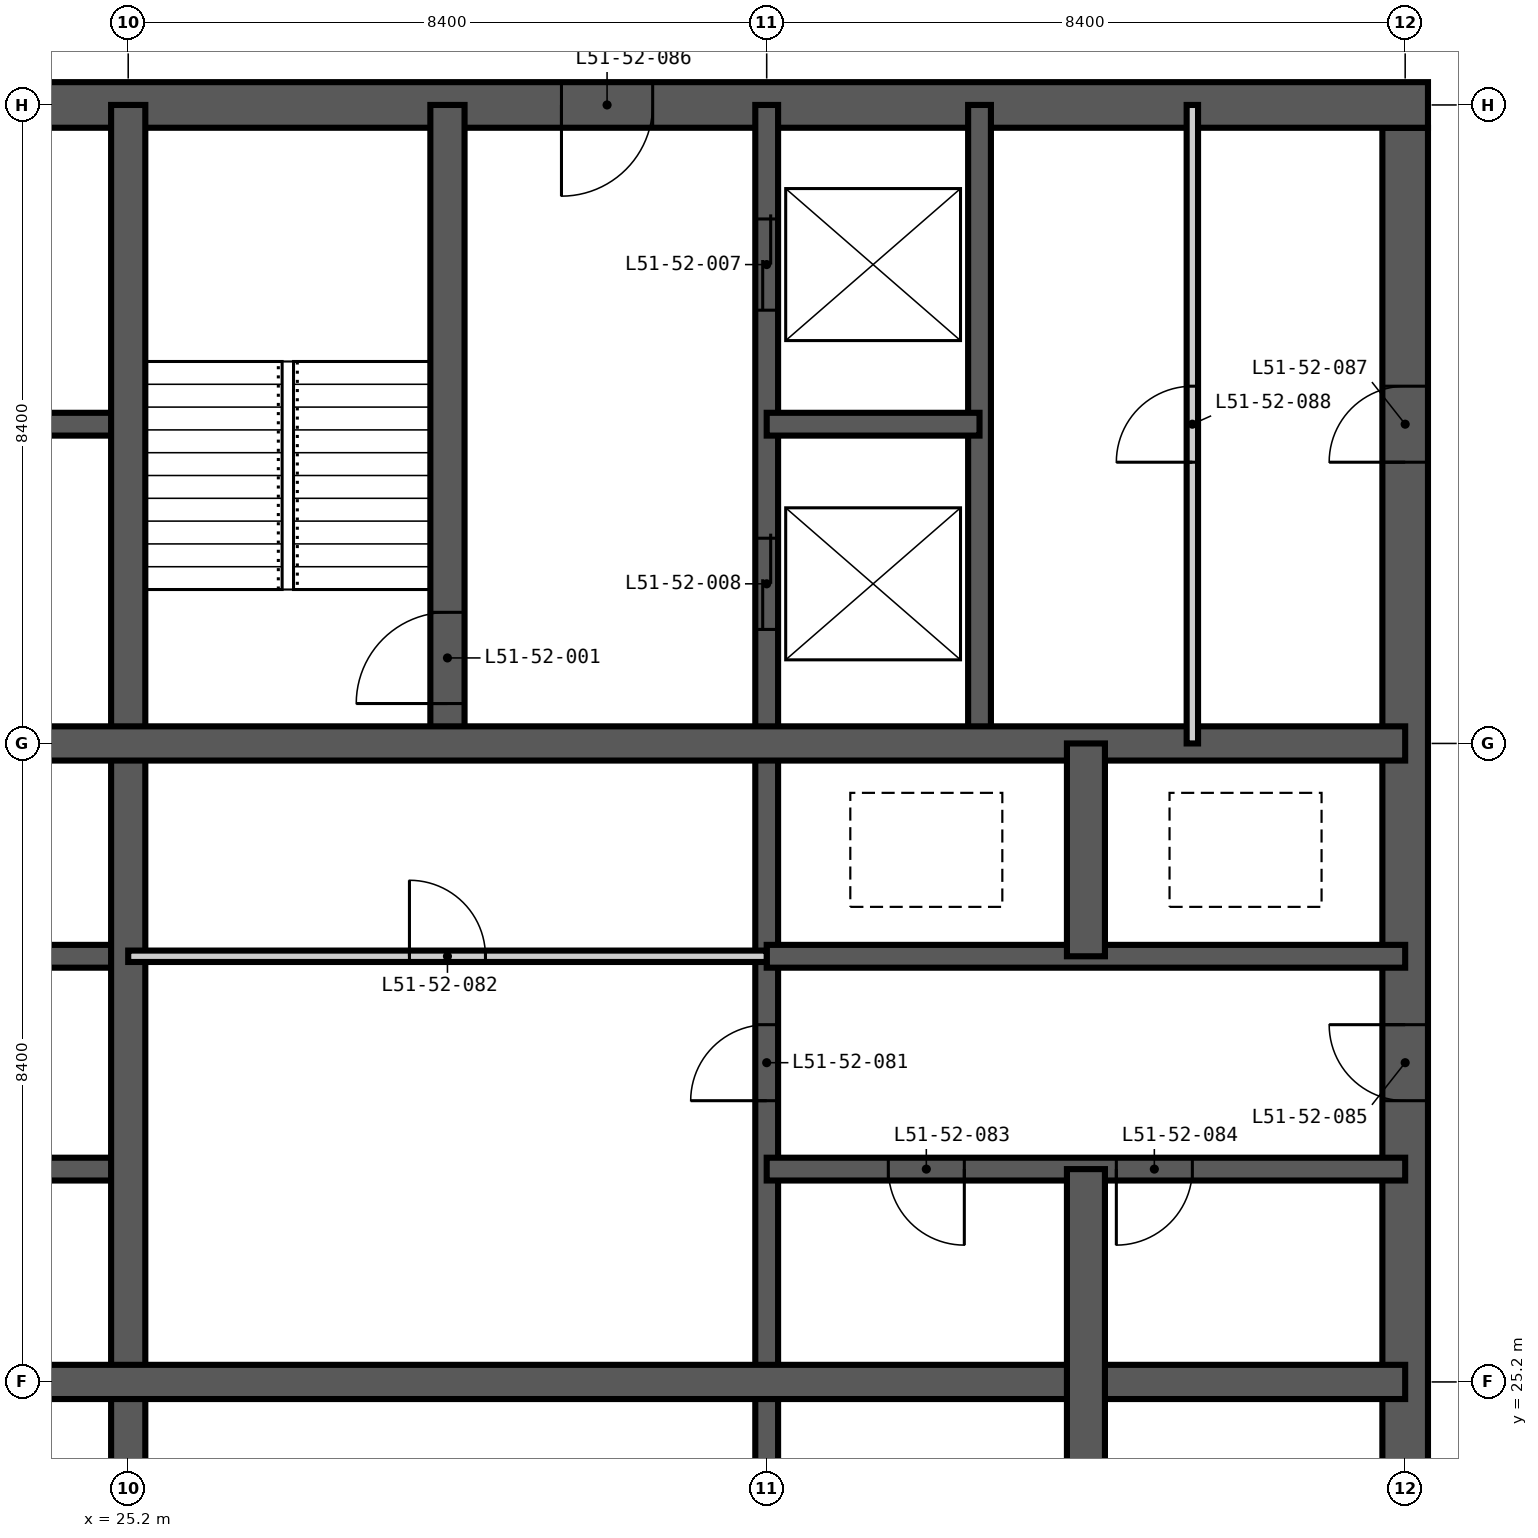
"""IFC4 building model, lengths in metres.
Left out: names, types, materials, properties, quantities, classifications, styles, units other than length and angle.
Written with IfcOpenShell. Run it as: python <this file> out.ifc"""

import sys

from ifc_helpers import new_model, si_unit, direction, frame, frame_2d, origin, place, context, subcontext, project, spatial, rectangle, extrude, element, fill, save


model = new_model("IFC4")
c1 = context("Model", 3, precision=1e-05, world=origin(), true_north=direction((0.0, 1.0)))
c2 = subcontext(c1, "Body", "Model", "MODEL_VIEW")
j1 = project(units=[si_unit("LENGTHUNIT", "METRE"), si_unit("PLANEANGLEUNIT", "RADIAN")], contexts=[c1])
p1 = place(None, origin())
s1 = spatial("IfcSite", under=j1, at=p1, CompositionType="ELEMENT")
p2 = place(p1, origin())
s2 = spatial("IfcBuilding", under=s1, at=p2, CompositionType="ELEMENT")
p3 = place(p2, frame((0.0, 0.0, 198.6)))
s3 = spatial("IfcBuildingStorey", under=s2, at=p3, CompositionType="ELEMENT", Elevation=198.6)
p4 = place(p3, frame((42.0, 17.1, -0.35), z_axis=(0.0, 0.0, 1.0), x_axis=(0.0, 1.0, 0.0)))
e1 = element("IfcWall", 1, at=p4, inside=s3, PredefinedType="SHEAR", context=c2, shape_type="SweptSolid", body=[
    extrude(rectangle(XDim=24.6, YDim=0.6, at=frame_2d((12.3, 0.0))), origin(), (0.0, 0.0, 1.0), 3.6),
])
p5 = place(p4, frame((0.5, 0.0, 0.35)))
e2 = element("IfcOpeningElement", 2, at=p5, cuts=e1, PredefinedType="OPENING", context=c2, shape_type="SweptSolid", body=[
    extrude(rectangle(XDim=1.2, YDim=2.2, at=frame_2d((0.6, 1.1))), frame((0.0, 0.31, 0.0), z_axis=(0.0, -1.0, 0.0), x_axis=(1.0, 0.0, 0.0)), (0.0, 0.0, 1.0), 0.62),
])
p6 = place(p4, frame((11.8, 0.0, 0.35)))
e3 = element("IfcOpeningElement", 3, at=p6, cuts=e1, PredefinedType="OPENING", context=c2, shape_type="SweptSolid", body=[
    extrude(rectangle(XDim=1.0, YDim=2.1, at=frame_2d((0.5, 1.05))), frame((0.0, 0.31, 0.0), z_axis=(0.0, -1.0, 0.0), x_axis=(1.0, 0.0, 0.0)), (0.0, 0.0, 1.0), 0.62),
])
p7 = place(p4, frame((20.2, 0.0, 0.35)))
e4 = element("IfcOpeningElement", 4, at=p7, cuts=e1, PredefinedType="OPENING", context=c2, shape_type="SweptSolid", body=[
    extrude(rectangle(XDim=1.0, YDim=2.1, at=frame_2d((0.5, 1.05))), frame((0.0, 0.31, 0.0), z_axis=(0.0, -1.0, 0.0), x_axis=(1.0, 0.0, 0.0)), (0.0, 0.0, 1.0), 0.62),
])
p8 = place(p3, frame((42.3, 42.0, -0.35), z_axis=(0.0, 0.0, 1.0), x_axis=(-1.0, 0.0, 0.0)))
e5 = element("IfcWall", 5, at=p8, inside=s3, PredefinedType="SHEAR", context=c2, shape_type="SweptSolid", body=[
    extrude(rectangle(XDim=25.8, YDim=0.6, at=frame_2d((12.9, 0.0))), origin(), (0.0, 0.0, 1.0), 3.6),
])
p9 = place(p8, frame((20.8, 0.0, 0.35)))
e6 = element("IfcOpeningElement", 6, at=p9, cuts=e5, PredefinedType="OPENING", context=c2, shape_type="SweptSolid", body=[
    extrude(rectangle(XDim=1.0, YDim=2.1, at=frame_2d((0.5, 1.05))), frame((0.0, 0.31, 0.0), z_axis=(0.0, -1.0, 0.0), x_axis=(1.0, 0.0, 0.0)), (0.0, 0.0, 1.0), 0.62),
])
p10 = place(p8, frame((10.2, 0.0, 0.35)))
e7 = element("IfcOpeningElement", 7, at=p10, cuts=e5, PredefinedType="OPENING", context=c2, shape_type="SweptSolid", body=[
    extrude(rectangle(XDim=1.2, YDim=2.2, at=frame_2d((0.6, 1.1))), frame((0.0, 0.31, 0.0), z_axis=(0.0, -1.0, 0.0), x_axis=(1.0, 0.0, 0.0)), (0.0, 0.0, 1.0), 0.62),
])
p11 = place(p3, frame((33.6, 16.8, -0.35), z_axis=(0.0, 0.0, 1.0), x_axis=(0.0, 1.0, 0.0)))
e8 = element("IfcWall", 8, at=p11, inside=s3, PredefinedType="SHEAR", context=c2, shape_type="SweptSolid", body=[
    extrude(rectangle(XDim=25.2, YDim=0.3, at=frame_2d((12.6, 0.0))), origin(), (0.0, 0.0, 1.0), 3.6),
])
p12 = place(p11, frame((22.5, 0.0, 0.35)))
e9 = element("IfcOpeningElement", 9, at=p12, cuts=e8, PredefinedType="OPENING", context=c2, shape_type="SweptSolid", body=[
    extrude(rectangle(XDim=1.2, YDim=2.2, at=frame_2d((0.6, 1.1))), frame((0.0, 0.16, 0.0), z_axis=(0.0, -1.0, 0.0), x_axis=(1.0, 0.0, 0.0)), (0.0, 0.0, 1.0), 0.32),
])
p13 = place(p11, frame((18.3, 0.0, 0.35)))
e10 = element("IfcOpeningElement", 10, at=p13, cuts=e8, PredefinedType="OPENING", context=c2, shape_type="SweptSolid", body=[
    extrude(rectangle(XDim=1.2, YDim=2.2, at=frame_2d((0.6, 1.1))), frame((0.0, 0.16, 0.0), z_axis=(0.0, -1.0, 0.0), x_axis=(1.0, 0.0, 0.0)), (0.0, 0.0, 1.0), 0.32),
])
p14 = place(p11, frame((12.1, 0.0, 0.35)))
e11 = element("IfcOpeningElement", 11, at=p14, cuts=e8, PredefinedType="OPENING", context=c2, shape_type="SweptSolid", body=[
    extrude(rectangle(XDim=1.0, YDim=2.1, at=frame_2d((0.5, 1.05))), frame((0.0, 0.16, 0.0), z_axis=(0.0, -1.0, 0.0), x_axis=(1.0, 0.0, 0.0)), (0.0, 0.0, 1.0), 0.32),
])
p15 = place(p3, frame((36.4, 33.6, -0.35), z_axis=(0.0, 0.0, 1.0), x_axis=(0.0, 1.0, 0.0)))
e12 = element("IfcWall", 12, at=p15, inside=s3, PredefinedType="SHEAR", context=c2, shape_type="SweptSolid", body=[
    extrude(rectangle(XDim=8.4, YDim=0.3, at=frame_2d((4.2, 0.0))), origin(), (0.0, 0.0, 1.0), 3.6),
])
p16 = place(p3, frame((16.8, 28.0, -0.35), z_axis=(0.0, 0.0, 1.0), x_axis=(1.0, 0.0, 0.0)))
e13 = element("IfcWall", 13, at=p16, inside=s3, PredefinedType="SHEAR", context=c2, shape_type="SweptSolid", body=[
    extrude(rectangle(XDim=8.4, YDim=0.3, at=frame_2d((4.2, 0.0))), origin(), (0.0, 0.0, 1.0), 3.6),
])
p17 = place(p16, frame((1.55, 0.0, 0.35)))
e14 = element("IfcOpeningElement", 14, at=p17, cuts=e13, PredefinedType="OPENING", context=c2, shape_type="SweptSolid", body=[
    extrude(rectangle(XDim=1.1, YDim=2.2, at=frame_2d((0.55, 1.1))), frame((0.0, 0.16, 0.0), z_axis=(0.0, -1.0, 0.0), x_axis=(1.0, 0.0, 0.0)), (0.0, 0.0, 1.0), 0.32),
])
p18 = place(p16, frame((5.75, 0.0, 0.35)))
e15 = element("IfcOpeningElement", 15, at=p18, cuts=e13, PredefinedType="OPENING", context=c2, shape_type="SweptSolid", body=[
    extrude(rectangle(XDim=1.1, YDim=2.2, at=frame_2d((0.55, 1.1))), frame((0.0, 0.16, 0.0), z_axis=(0.0, -1.0, 0.0), x_axis=(1.0, 0.0, 0.0)), (0.0, 0.0, 1.0), 0.32),
])
p19 = place(p3, frame((33.6, 28.0, -0.35), z_axis=(0.0, 0.0, 1.0), x_axis=(1.0, 0.0, 0.0)))
e16 = element("IfcWall", 16, at=p19, inside=s3, PredefinedType="SHEAR", context=c2, shape_type="SweptSolid", body=[
    extrude(rectangle(XDim=8.4, YDim=0.3, at=frame_2d((4.2, 0.0))), origin(), (0.0, 0.0, 1.0), 3.6),
])
p20 = place(p19, frame((1.6, 0.0, 0.35)))
e17 = element("IfcOpeningElement", 17, at=p20, cuts=e16, PredefinedType="OPENING", context=c2, shape_type="SweptSolid", body=[
    extrude(rectangle(XDim=1.0, YDim=2.1, at=frame_2d((0.5, 1.05))), frame((0.0, 0.16, 0.0), z_axis=(0.0, -1.0, 0.0), x_axis=(1.0, 0.0, 0.0)), (0.0, 0.0, 1.0), 0.32),
])
p21 = place(p19, frame((4.6, 0.0, 0.35)))
e18 = element("IfcOpeningElement", 18, at=p21, cuts=e16, PredefinedType="OPENING", context=c2, shape_type="SweptSolid", body=[
    extrude(rectangle(XDim=1.0, YDim=2.1, at=frame_2d((0.5, 1.05))), frame((0.0, 0.16, 0.0), z_axis=(0.0, -1.0, 0.0), x_axis=(1.0, 0.0, 0.0)), (0.0, 0.0, 1.0), 0.32),
])
p22 = place(p3, frame((16.8, 30.8, -0.35), z_axis=(0.0, 0.0, 1.0), x_axis=(1.0, 0.0, 0.0)))
e19 = element("IfcWall", 19, at=p22, inside=s3, PredefinedType="SHEAR", context=c2, shape_type="SweptSolid", body=[
    extrude(rectangle(XDim=8.4, YDim=0.3, at=frame_2d((4.2, 0.0))), origin(), (0.0, 0.0, 1.0), 3.6),
])
p23 = place(p22, frame((1.55, 0.0, 0.35)))
e20 = element("IfcOpeningElement", 20, at=p23, cuts=e19, PredefinedType="OPENING", context=c2, shape_type="SweptSolid", body=[
    extrude(rectangle(XDim=1.1, YDim=2.2, at=frame_2d((0.55, 1.1))), frame((0.0, 0.16, 0.0), z_axis=(0.0, -1.0, 0.0), x_axis=(1.0, 0.0, 0.0)), (0.0, 0.0, 1.0), 0.32),
])
p24 = place(p22, frame((5.75, 0.0, 0.35)))
e21 = element("IfcOpeningElement", 21, at=p24, cuts=e19, PredefinedType="OPENING", context=c2, shape_type="SweptSolid", body=[
    extrude(rectangle(XDim=1.1, YDim=2.2, at=frame_2d((0.55, 1.1))), frame((0.0, 0.16, 0.0), z_axis=(0.0, -1.0, 0.0), x_axis=(1.0, 0.0, 0.0)), (0.0, 0.0, 1.0), 0.32),
])
for number, where, z_axis, x_axis in (
    (22, (33.6, 30.8, -0.35), (0.0, 0.0, 1.0), (1.0, 0.0, 0.0)),
    (23, (16.8, 37.8, -0.35), (0.0, 0.0, 1.0), (1.0, 0.0, 0.0)),
):
    element("IfcWall", number, at=place(p3, frame(where, z_axis=z_axis, x_axis=x_axis)), inside=s3, PredefinedType="SHEAR", context=c2, shape_type="SweptSolid", body=[
        extrude(rectangle(XDim=8.4, YDim=0.3, at=frame_2d((4.2, 0.0))), origin(), (0.0, 0.0, 1.0), 3.6),
    ])
p25 = place(p3, frame((33.6, 37.8, -0.35), z_axis=(0.0, 0.0, 1.0), x_axis=(1.0, 0.0, 0.0)))
e24 = element("IfcWall", 24, at=p25, inside=s3, PredefinedType="SHEAR", context=c2, shape_type="SweptSolid", body=[
    extrude(rectangle(XDim=2.8, YDim=0.3, at=frame_2d((1.4, 0.0))), origin(), (0.0, 0.0, 1.0), 3.6),
])
p26 = place(p3, frame((25.2, 16.8, -0.35), z_axis=(0.0, 0.0, 1.0), x_axis=(0.0, 1.0, 0.0)))
e25 = element("IfcWall", 25, at=p26, inside=s3, PredefinedType="SHEAR", context=c2, shape_type="SweptSolid", body=[
    extrude(rectangle(XDim=25.2, YDim=0.45, at=frame_2d((12.6, 0.0))), origin(), (0.0, 0.0, 1.0), 3.6),
])
p27 = place(p3, frame((29.4, 33.6, -0.35), z_axis=(0.0, 0.0, 1.0), x_axis=(0.0, 1.0, 0.0)))
e26 = element("IfcWall", 26, at=p27, inside=s3, PredefinedType="SHEAR", context=c2, shape_type="SweptSolid", body=[
    extrude(rectangle(XDim=8.4, YDim=0.45, at=frame_2d((4.2, 0.0))), origin(), (0.0, 0.0, 1.0), 3.6),
])
p28 = place(p27, frame((0.525, 0.0, 0.35)))
e27 = element("IfcOpeningElement", 27, at=p28, cuts=e26, PredefinedType="OPENING", context=c2, shape_type="SweptSolid", body=[
    extrude(rectangle(XDim=1.2, YDim=2.2, at=frame_2d((0.6, 1.1))), frame((0.0, 0.235, 0.0), z_axis=(0.0, -1.0, 0.0), x_axis=(1.0, 0.0, 0.0)), (0.0, 0.0, 1.0), 0.47),
])
for number, where, z_axis, x_axis in (
    (28, (16.8, 25.2, -0.35), (0.0, 0.0, 1.0), (1.0, 0.0, 0.0)),
    (29, (16.8, 33.6, -0.35), (0.0, 0.0, 1.0), (1.0, 0.0, 0.0)),
):
    element("IfcWall", number, at=place(p3, frame(where, z_axis=z_axis, x_axis=x_axis)), inside=s3, PredefinedType="SHEAR", context=c2, shape_type="SweptSolid", body=[
        extrude(rectangle(XDim=25.2, YDim=0.45, at=frame_2d((12.6, 0.0))), origin(), (0.0, 0.0, 1.0), 3.6),
    ])
p29 = place(p3, frame((37.8, 16.8, -0.35), z_axis=(0.0, 0.0, 1.0), x_axis=(0.0, 1.0, 0.0)))
e30 = element("IfcWall", 30, at=p29, inside=s3, PredefinedType="SHEAR", context=c2, shape_type="SweptSolid", body=[
    extrude(rectangle(XDim=11.2, YDim=0.5, at=frame_2d((5.6, 0.0))), origin(), (0.0, 0.0, 1.0), 3.6),
])
p30 = place(p3, frame((37.8, 30.8, -0.35), z_axis=(0.0, 0.0, 1.0), x_axis=(0.0, 1.0, 0.0)))
e31 = element("IfcWall", 31, at=p30, inside=s3, PredefinedType="SHEAR", context=c2, shape_type="SweptSolid", body=[
    extrude(rectangle(XDim=2.8, YDim=0.5, at=frame_2d((1.4, 0.0))), origin(), (0.0, 0.0, 1.0), 3.6),
])
p31 = place(p3, frame((39.2, 33.6, 0.0), z_axis=(0.0, 0.0, 1.0), x_axis=(0.0, 1.0, 0.0)))
e32 = element("IfcWall", 32, at=p31, inside=s3, PredefinedType="PARTITIONING", context=c2, shape_type="SweptSolid", body=[
    extrude(rectangle(XDim=8.4, YDim=0.15, at=frame_2d((4.2, 0.0))), origin(), (0.0, 0.0, 1.0), 3.25),
])
p32 = place(p31, frame((3.7, 0.0, 0.0)))
e33 = element("IfcOpeningElement", 33, at=p32, cuts=e32, PredefinedType="OPENING", context=c2, shape_type="SweptSolid", body=[
    extrude(rectangle(XDim=1.0, YDim=2.1, at=frame_2d((0.5, 1.05))), frame((0.0, 0.085, 0.0), z_axis=(0.0, -1.0, 0.0), x_axis=(1.0, 0.0, 0.0)), (0.0, 0.0, 1.0), 0.17),
])
p33 = place(p3, frame((25.2, 30.8, 0.0), z_axis=(0.0, 0.0, 1.0), x_axis=(1.0, 0.0, 0.0)))
e34 = element("IfcWall", 34, at=p33, inside=s3, PredefinedType="PARTITIONING", context=c2, shape_type="SweptSolid", body=[
    extrude(rectangle(XDim=8.4, YDim=0.15, at=frame_2d((4.2, 0.0))), origin(), (0.0, 0.0, 1.0), 3.25),
])
p34 = place(p33, frame((3.7, 0.0, 0.0)))
e35 = element("IfcOpeningElement", 35, at=p34, cuts=e34, PredefinedType="OPENING", context=c2, shape_type="SweptSolid", body=[
    extrude(rectangle(XDim=1.0, YDim=2.1, at=frame_2d((0.5, 1.05))), frame((0.0, 0.085, 0.0), z_axis=(0.0, -1.0, 0.0), x_axis=(1.0, 0.0, 0.0)), (0.0, 0.0, 1.0), 0.17),
])
p35 = place(p28, origin())
e36 = element("IfcDoor", 36, at=p35, inside=s3, OperationType="SINGLE_SWING_LEFT", PredefinedType="DOOR", context=c2, shape_type="SweptSolid", body=[
    extrude(rectangle(XDim=1.2, YDim=2.2, at=frame_2d((0.6, 1.1))), frame((0.0, 0.025, 0.0), z_axis=(0.0, -1.0, 0.0), x_axis=(1.0, 0.0, 0.0)), (0.0, 0.0, 1.0), 0.05),
])
fill(e27, e36)
p36 = place(p12, origin())
e37 = element("IfcDoor", 37, at=p36, inside=s3, OperationType="DOUBLE_DOOR_SLIDING", PredefinedType="DOOR", context=c2, shape_type="SweptSolid", body=[
    extrude(rectangle(XDim=1.2, YDim=2.2, at=frame_2d((0.6, 1.1))), frame((0.0, 0.025, 0.0), z_axis=(0.0, -1.0, 0.0), x_axis=(1.0, 0.0, 0.0)), (0.0, 0.0, 1.0), 0.05),
])
fill(e9, e37)
p37 = place(p13, origin())
e38 = element("IfcDoor", 38, at=p37, inside=s3, OperationType="DOUBLE_DOOR_SLIDING", PredefinedType="DOOR", context=c2, shape_type="SweptSolid", body=[
    extrude(rectangle(XDim=1.2, YDim=2.2, at=frame_2d((0.6, 1.1))), frame((0.0, 0.025, 0.0), z_axis=(0.0, -1.0, 0.0), x_axis=(1.0, 0.0, 0.0)), (0.0, 0.0, 1.0), 0.05),
])
fill(e10, e38)
p38 = place(p14, origin())
e39 = element("IfcDoor", 39, at=p38, inside=s3, OperationType="SINGLE_SWING_LEFT", PredefinedType="DOOR", context=c2, shape_type="SweptSolid", body=[
    extrude(rectangle(XDim=1.0, YDim=2.1, at=frame_2d((0.5, 1.05))), frame((0.0, 0.025, 0.0), z_axis=(0.0, -1.0, 0.0), x_axis=(1.0, 0.0, 0.0)), (0.0, 0.0, 1.0), 0.05),
])
fill(e11, e39)
p39 = place(p34, origin())
e40 = element("IfcDoor", 40, at=p39, inside=s3, OperationType="SINGLE_SWING_LEFT", PredefinedType="DOOR", context=c2, shape_type="SweptSolid", body=[
    extrude(rectangle(XDim=1.0, YDim=2.1, at=frame_2d((0.5, 1.05))), frame((0.0, 0.025, 0.0), z_axis=(0.0, -1.0, 0.0), x_axis=(1.0, 0.0, 0.0)), (0.0, 0.0, 1.0), 0.05),
])
fill(e35, e40)
p40 = place(p20, frame((1.0, 0.0, 0.0), z_axis=(0.0, 0.0, 1.0), x_axis=(-1.0, 0.0, 0.0)))
e41 = element("IfcDoor", 41, at=p40, inside=s3, OperationType="SINGLE_SWING_LEFT", PredefinedType="DOOR", context=c2, shape_type="SweptSolid", body=[
    extrude(rectangle(XDim=1.0, YDim=2.1, at=frame_2d((0.5, 1.05))), frame((0.0, 0.025, 0.0), z_axis=(0.0, -1.0, 0.0), x_axis=(1.0, 0.0, 0.0)), (0.0, 0.0, 1.0), 0.05),
])
fill(e17, e41)
p41 = place(p21, frame((1.0, 0.0, 0.0), z_axis=(0.0, 0.0, 1.0), x_axis=(-1.0, 0.0, 0.0)))
e42 = element("IfcDoor", 42, at=p41, inside=s3, OperationType="SINGLE_SWING_RIGHT", PredefinedType="DOOR", context=c2, shape_type="SweptSolid", body=[
    extrude(rectangle(XDim=1.0, YDim=2.1, at=frame_2d((0.5, 1.05))), frame((0.0, 0.025, 0.0), z_axis=(0.0, -1.0, 0.0), x_axis=(1.0, 0.0, 0.0)), (0.0, 0.0, 1.0), 0.05),
])
fill(e18, e42)
p42 = place(p6, origin())
e43 = element("IfcDoor", 43, at=p42, inside=s3, OperationType="SINGLE_SWING_RIGHT", PredefinedType="DOOR", context=c2, shape_type="SweptSolid", body=[
    extrude(rectangle(XDim=1.0, YDim=2.1, at=frame_2d((0.5, 1.05))), frame((0.0, 0.025, 0.0), z_axis=(0.0, -1.0, 0.0), x_axis=(1.0, 0.0, 0.0)), (0.0, 0.0, 1.0), 0.05),
])
fill(e3, e43)
p43 = place(p10, origin())
e44 = element("IfcDoor", 44, at=p43, inside=s3, OperationType="SINGLE_SWING_RIGHT", PredefinedType="DOOR", context=c2, shape_type="SweptSolid", body=[
    extrude(rectangle(XDim=1.2, YDim=2.2, at=frame_2d((0.6, 1.1))), frame((0.0, 0.025, 0.0), z_axis=(0.0, -1.0, 0.0), x_axis=(1.0, 0.0, 0.0)), (0.0, 0.0, 1.0), 0.05),
])
fill(e7, e44)
p44 = place(p7, origin())
e45 = element("IfcDoor", 45, at=p44, inside=s3, OperationType="SINGLE_SWING_LEFT", PredefinedType="DOOR", context=c2, shape_type="SweptSolid", body=[
    extrude(rectangle(XDim=1.0, YDim=2.1, at=frame_2d((0.5, 1.05))), frame((0.0, 0.025, 0.0), z_axis=(0.0, -1.0, 0.0), x_axis=(1.0, 0.0, 0.0)), (0.0, 0.0, 1.0), 0.05),
])
fill(e4, e45)
p45 = place(p32, origin())
e46 = element("IfcDoor", 46, at=p45, inside=s3, OperationType="SINGLE_SWING_LEFT", PredefinedType="DOOR", context=c2, shape_type="SweptSolid", body=[
    extrude(rectangle(XDim=1.0, YDim=2.1, at=frame_2d((0.5, 1.05))), frame((0.0, 0.025, 0.0), z_axis=(0.0, -1.0, 0.0), x_axis=(1.0, 0.0, 0.0)), (0.0, 0.0, 1.0), 0.05),
])
fill(e33, e46)
save(model, sys.argv[1])
